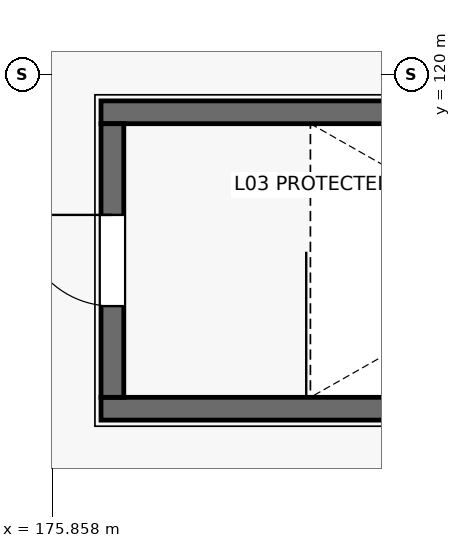
"""IFC4 building model, lengths in metres.
Left out: names, types, materials, properties, quantities, classifications, styles, units other than length and angle.
Written with IfcOpenShell. Run it as: python <this file> out.ifc"""

import sys

from ifc_helpers import new_model, si_unit, direction, frame, frame_2d, origin, place, context, subcontext, project, spatial, rectangle, extrude, element, fill, save


model = new_model("IFC4")
c1 = context("Model", 3, precision=1e-05, world=origin(), true_north=direction((0.0, 1.0)))
c2 = subcontext(c1, "Body", "Model", "MODEL_VIEW")
j1 = project(units=[si_unit("LENGTHUNIT", "METRE"), si_unit("PLANEANGLEUNIT", "RADIAN")], contexts=[c1])
p1 = place(None, origin())
s1 = spatial("IfcSite", under=j1, at=p1, CompositionType="ELEMENT")
p2 = place(p1, origin())
s2 = spatial("IfcBuilding", under=s1, at=p2, CompositionType="ELEMENT")
p3 = place(p2, frame((0.0, 0.0, 13.2)))
s3 = spatial("IfcBuildingStorey", under=s2, at=p3, CompositionType="ELEMENT", Elevation=13.2)
for number, where, z_axis, x_axis in (
    (1, (185.9, 115.6, 0.0), (0.0, 0.0, 1.0), (-1.0, 0.0, 0.0)),
    (2, (176.5, 119.5, 0.0), (0.0, 0.0, 1.0), (1.0, 0.0, 0.0)),
):
    element("IfcWall", number, at=place(p3, frame(where, z_axis=z_axis, x_axis=x_axis)), inside=s3, PredefinedType="SOLIDWALL", context=c2, shape_type="SweptSolid", body=[
        extrude(rectangle(XDim=9.4, YDim=0.3, at=frame_2d((4.7, 0.0))), origin(), (0.0, 0.0, 1.0), 3.4),
    ])
p4 = place(p3, frame((176.65, 115.75, 0.0), z_axis=(0.0, 0.0, 1.0), x_axis=(0.0, 1.0, 0.0)))
e3 = element("IfcWall", 3, at=p4, inside=s3, PredefinedType="SOLIDWALL", context=c2, shape_type="SweptSolid", body=[
    extrude(rectangle(XDim=3.6, YDim=0.3, at=frame_2d((1.8, 0.0))), origin(), (0.0, 0.0, 1.0), 3.4),
])
p5 = place(p4, frame((1.2, 0.0, 0.0)))
e4 = element("IfcOpeningElement", 4, at=p5, cuts=e3, PredefinedType="OPENING", context=c2, shape_type="SweptSolid", body=[
    extrude(rectangle(XDim=1.2, YDim=2.2, at=frame_2d((0.6, 1.1))), frame((0.0, 0.16, 0.0), z_axis=(0.0, -1.0, 0.0), x_axis=(1.0, 0.0, 0.0)), (0.0, 0.0, 1.0), 0.32),
])
p6 = place(p5, origin())
e5 = element("IfcDoor", 5, at=p6, inside=s3, OperationType="SINGLE_SWING_RIGHT", PredefinedType="DOOR", context=c2, shape_type="SweptSolid", body=[
    extrude(rectangle(XDim=1.2, YDim=2.2, at=frame_2d((0.6, 1.1))), frame((0.0, 0.025, 0.0), z_axis=(0.0, -1.0, 0.0), x_axis=(1.0, 0.0, 0.0)), (0.0, 0.0, 1.0), 0.05),
])
fill(e4, e5)
save(model, sys.argv[1])
